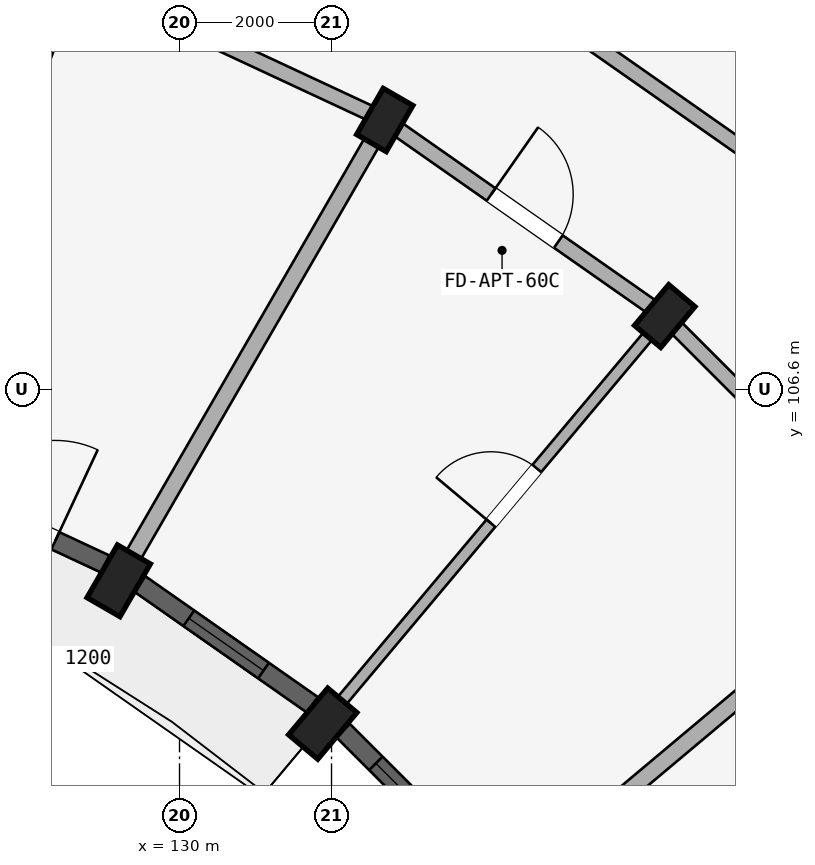
"""IFC4 building model, lengths in metres.
Left out: names, types, materials, properties, quantities, classifications, styles, units other than length and angle.
Written with IfcOpenShell. Run it as: python <this file> out.ifc"""

import sys

from ifc_helpers import new_model, si_unit, direction, frame, frame_2d, origin, origin_2d, place, context, subcontext, project, spatial, rectangle, extrude, element, fill, save


model = new_model("IFC4")
c1 = context("Model", 3, precision=1e-05, world=origin(), true_north=direction((0.0, 1.0)))
c2 = subcontext(c1, "Body", "Model", "MODEL_VIEW")
j1 = project(units=[si_unit("LENGTHUNIT", "METRE"), si_unit("PLANEANGLEUNIT", "RADIAN")], contexts=[c1])
p1 = place(None, origin())
s1 = spatial("IfcSite", under=j1, at=p1, CompositionType="ELEMENT")
p2 = place(p1, origin())
s2 = spatial("IfcBuilding", under=s1, at=p2, CompositionType="ELEMENT")
p3 = place(p2, frame((0.0, 0.0, 18.15)))
s3 = spatial("IfcBuildingStorey", under=s2, at=p3, CompositionType="ELEMENT", Elevation=18.15)
p4 = place(p3, frame((129.2, 104.081, 0.0), z_axis=(0.0, 0.0, 1.0), x_axis=(-0.866025403784, 0.5, 0.0)))
e1 = element("IfcColumn", 1, at=p4, inside=s3, PredefinedType="COLUMN", context=c2, shape_type="SweptSolid", body=[
    extrude(rectangle(XDim=0.5, YDim=0.8, at=origin_2d()), origin(), (0.0, 0.0, 1.0), 2.93),
])
p5 = place(p3, frame((132.7, 110.144, 0.0), z_axis=(0.0, 0.0, 1.0), x_axis=(-0.866025403784, 0.5, 0.0)))
e2 = element("IfcColumn", 2, at=p5, inside=s3, PredefinedType="COLUMN", context=c2, shape_type="SweptSolid", body=[
    extrude(rectangle(XDim=0.45, YDim=0.7, at=origin_2d()), origin(), (0.0, 0.0, 1.0), 2.93),
])
p6 = place(p3, frame((131.885, 102.202, 0.0), z_axis=(0.0, 0.0, 1.0), x_axis=(-0.766044443119, 0.642787609687, 0.0)))
e3 = element("IfcColumn", 3, at=p6, inside=s3, PredefinedType="COLUMN", context=c2, shape_type="SweptSolid", body=[
    extrude(rectangle(XDim=0.5, YDim=0.8, at=origin_2d()), origin(), (0.0, 0.0, 1.0), 2.93),
])
p7 = place(p3, frame((136.384, 107.564, 0.0), z_axis=(0.0, 0.0, 1.0), x_axis=(-0.766044443119, 0.642787609687, 0.0)))
e4 = element("IfcColumn", 4, at=p7, inside=s3, PredefinedType="COLUMN", context=c2, shape_type="SweptSolid", body=[
    extrude(rectangle(XDim=0.45, YDim=0.7, at=origin_2d()), origin(), (0.0, 0.0, 1.0), 2.93),
])
p8 = place(p3, frame((128.624, 112.044, 0.0), z_axis=(0.0, 0.0, 1.0), x_axis=(0.906307919131, -0.422617978463, 0.0)))
e5 = element("IfcWall", 5, at=p8, inside=s3, PredefinedType="STANDARD", context=c2, shape_type="SweptSolid", body=[
    extrude(rectangle(XDim=4.497, YDim=0.2, at=frame_2d((2.249, 0.0))), origin(), (0.0, 0.0, 1.0), 2.372),
])
p9 = place(p3, frame((132.7, 110.144, 0.0), z_axis=(0.0, 0.0, 1.0), x_axis=(0.819155404658, -0.573571637217, 0.0)))
e6 = element("IfcWall", 6, at=p9, inside=s3, PredefinedType="STANDARD", context=c2, shape_type="SweptSolid", body=[
    extrude(rectangle(XDim=4.497, YDim=0.2, at=frame_2d((2.249, 0.0))), origin(), (0.0, 0.0, 1.0), 2.372),
])
p10 = place(p9, frame((1.709, 0.0, 0.0)))
e7 = element("IfcOpeningElement", 7, at=p10, cuts=e6, PredefinedType="OPENING", context=c2, shape_type="SweptSolid", body=[
    extrude(rectangle(XDim=1.08, YDim=2.15, at=frame_2d((0.54, 1.075))), frame((0.0, 0.11, 0.0), z_axis=(0.0, -1.0, 0.0), x_axis=(1.0, 0.0, 0.0)), (0.0, 0.0, 1.0), 0.22),
])
p11 = place(p3, frame((133.9, 112.222, 0.0), z_axis=(0.0, 0.0, 1.0), x_axis=(0.819140911474, -0.573592335331, 0.0)))
e8 = element("IfcWall", 8, at=p11, inside=s3, PredefinedType="STANDARD", context=c2, shape_type="SweptSolid", body=[
    extrude(rectangle(XDim=4.916, YDim=0.2, at=frame_2d((2.458, 0.0))), origin(), (0.0, 0.0, 1.0), 2.372),
])
p12 = place(p3, frame((136.384, 107.564, 0.0), z_axis=(0.0, 0.0, 1.0), x_axis=(0.707106781187, -0.707106781187, 0.0)))
e9 = element("IfcWall", 9, at=p12, inside=s3, PredefinedType="STANDARD", context=c2, shape_type="SweptSolid", body=[
    extrude(rectangle(XDim=4.497, YDim=0.2, at=frame_2d((2.249, 0.0))), origin(), (0.0, 0.0, 1.0), 2.372),
])
p13 = place(p3, frame((126.298, 105.654, 0.0), z_axis=(0.0, 0.0, 1.0), x_axis=(0.342010221662, 0.939696231917, 0.0)))
e10 = element("IfcWall", 10, at=p13, inside=s3, PredefinedType="PARTITIONING", context=c2, shape_type="SweptSolid", body=[
    extrude(rectangle(XDim=6.75, YDim=0.15, at=frame_2d((3.375, 0.0))), origin(), (0.0, 0.0, 1.0), 2.372),
])
p14 = place(p13, frame((3.222, 0.0, 0.0)))
e11 = element("IfcOpeningElement", 11, at=p14, cuts=e10, PredefinedType="OPENING", context=c2, shape_type="SweptSolid", body=[
    extrude(rectangle(XDim=0.98, YDim=2.12, at=frame_2d((0.49, 1.06))), frame((0.0, 0.085, 0.0), z_axis=(0.0, -1.0, 0.0), x_axis=(1.0, 0.0, 0.0)), (0.0, 0.0, 1.0), 0.17),
])
p15 = place(p3, frame((129.3, 104.254, 0.0), z_axis=(0.0, 0.0, 1.0), x_axis=(0.499997969693, 0.866026575979, 0.0)))
e12 = element("IfcWall", 12, at=p15, inside=s3, PredefinedType="STANDARD", context=c2, shape_type="SweptSolid", body=[
    extrude(rectangle(XDim=6.75, YDim=0.22, at=frame_2d((3.375, 0.0))), origin(), (0.0, 0.0, 1.0), 2.372),
])
p16 = place(p3, frame((132.013, 102.355, 0.0), z_axis=(0.0, 0.0, 1.0), x_axis=(0.642784846501, 0.766046761698, 0.0)))
e13 = element("IfcWall", 13, at=p16, inside=s3, PredefinedType="PARTITIONING", context=c2, shape_type="SweptSolid", body=[
    extrude(rectangle(XDim=6.75, YDim=0.15, at=frame_2d((3.375, 0.0))), origin(), (0.0, 0.0, 1.0), 2.372),
])
p17 = place(p16, frame((3.242, 0.0, 0.0)))
e14 = element("IfcOpeningElement", 14, at=p17, cuts=e13, PredefinedType="OPENING", context=c2, shape_type="SweptSolid", body=[
    extrude(rectangle(XDim=0.94, YDim=2.1, at=frame_2d((0.47, 1.05))), frame((0.0, 0.085, 0.0), z_axis=(0.0, -1.0, 0.0), x_axis=(1.0, 0.0, 0.0)), (0.0, 0.0, 1.0), 0.17),
])
p18 = place(p3, frame((134.355, 100.013, 0.0), z_axis=(0.0, 0.0, 1.0), x_axis=(0.766046761698, 0.642784846501, 0.0)))
e15 = element("IfcWall", 15, at=p18, inside=s3, PredefinedType="STANDARD", context=c2, shape_type="SweptSolid", body=[
    extrude(rectangle(XDim=6.75, YDim=0.22, at=frame_2d((3.375, 0.0))), origin(), (0.0, 0.0, 1.0), 2.372),
])
p19 = place(p3, frame((126.513, 105.472, 0.0), z_axis=(0.0, 0.0, 1.0), x_axis=(0.906293449611, -0.422649007088, 0.0)))
e16 = element("IfcWall", 16, at=p19, inside=s3, PredefinedType="STANDARD", context=c2, shape_type="SweptSolid", body=[
    extrude(rectangle(XDim=2.77, YDim=0.25, at=frame_2d((1.385, 0.0))), origin(), (0.0, 0.0, 1.0), 2.422),
])
p20 = place(p19, frame((0.725, 0.0, 0.0)))
e17 = element("IfcOpeningElement", 17, at=p20, cuts=e16, PredefinedType="OPENING", context=c2, shape_type="SweptSolid", body=[
    extrude(rectangle(XDim=1.32, YDim=2.15, at=frame_2d((0.66, 1.075))), frame((0.0, 0.135, 0.0), z_axis=(0.0, -1.0, 0.0), x_axis=(1.0, 0.0, 0.0)), (0.0, 0.0, 1.0), 0.27),
])
p21 = place(p3, frame((129.479, 104.038, 0.0), z_axis=(0.0, 0.0, 1.0), x_axis=(0.819111815273, -0.573633885053, 0.0)))
e18 = element("IfcWall", 18, at=p21, inside=s3, PredefinedType="STANDARD", context=c2, shape_type="SweptSolid", body=[
    extrude(rectangle(XDim=2.77, YDim=0.25, at=frame_2d((1.385, 0.0))), origin(), (0.0, 0.0, 1.0), 2.422),
])
p22 = place(p21, frame((0.785, 0.0, 0.722)))
e19 = element("IfcOpeningElement", 19, at=p22, cuts=e18, PredefinedType="OPENING", context=c2, shape_type="SweptSolid", body=[
    extrude(rectangle(XDim=1.2, YDim=1.5, at=frame_2d((0.6, 0.75))), frame((0.0, 0.135, 0.0), z_axis=(0.0, -1.0, 0.0), x_axis=(1.0, 0.0, 0.0)), (0.0, 0.0, 1.0), 0.27),
])
p23 = place(p3, frame((132.152, 102.111, 0.0), z_axis=(0.0, 0.0, 1.0), x_axis=(0.707106781187, -0.707106781187, 0.0)))
e20 = element("IfcWall", 20, at=p23, inside=s3, PredefinedType="STANDARD", context=c2, shape_type="SweptSolid", body=[
    extrude(rectangle(XDim=2.77, YDim=0.25, at=frame_2d((1.385, 0.0))), origin(), (0.0, 0.0, 1.0), 2.422),
])
p24 = place(p23, frame((0.61, 0.0, 0.622)))
e21 = element("IfcOpeningElement", 21, at=p24, cuts=e20, PredefinedType="OPENING", context=c2, shape_type="SweptSolid", body=[
    extrude(rectangle(XDim=1.55, YDim=1.6, at=frame_2d((0.775, 0.8))), frame((0.0, 0.135, 0.0), z_axis=(0.0, -1.0, 0.0), x_axis=(1.0, 0.0, 0.0)), (0.0, 0.0, 1.0), 0.27),
])
p25 = place(p22, origin())
e22 = element("IfcWindow", 22, at=p25, inside=s3, PartitioningType="SINGLE_PANEL", PredefinedType="WINDOW", context=c2, shape_type="SweptSolid", body=[
    extrude(rectangle(XDim=1.2, YDim=1.5, at=frame_2d((0.6, 0.75))), frame((0.0, 0.03, 0.0), z_axis=(0.0, -1.0, 0.0), x_axis=(1.0, 0.0, 0.0)), (0.0, 0.0, 1.0), 0.06),
])
fill(e19, e22)
p26 = place(p24, origin())
e23 = element("IfcWindow", 23, at=p26, inside=s3, PartitioningType="DOUBLE_PANEL_VERTICAL", PredefinedType="WINDOW", context=c2, shape_type="SweptSolid", body=[
    extrude(rectangle(XDim=1.55, YDim=1.6, at=frame_2d((0.775, 0.8))), frame((0.0, 0.03, 0.0), z_axis=(0.0, -1.0, 0.0), x_axis=(1.0, 0.0, 0.0)), (0.0, 0.0, 1.0), 0.06),
])
fill(e21, e23)
p27 = place(p17, origin())
e24 = element("IfcDoor", 24, at=p27, inside=s3, OperationType="SINGLE_SWING_LEFT", PredefinedType="DOOR", context=c2, shape_type="SweptSolid", body=[
    extrude(rectangle(XDim=0.94, YDim=2.1, at=frame_2d((0.47, 1.05))), frame((0.0, 0.025, 0.0), z_axis=(0.0, -1.0, 0.0), x_axis=(1.0, 0.0, 0.0)), (0.0, 0.0, 1.0), 0.05),
])
fill(e14, e24)
p28 = place(p10, origin())
e25 = element("IfcDoor", 25, at=p28, inside=s3, OperationType="SINGLE_SWING_LEFT", PredefinedType="DOOR", context=c2, shape_type="SweptSolid", body=[
    extrude(rectangle(XDim=1.08, YDim=2.15, at=frame_2d((0.54, 1.075))), frame((0.0, 0.025, 0.0), z_axis=(0.0, -1.0, 0.0), x_axis=(1.0, 0.0, 0.0)), (0.0, 0.0, 1.0), 0.05),
])
fill(e7, e25)
p29 = place(p20, frame((1.32, 0.0, 0.0), z_axis=(0.0, 0.0, 1.0), x_axis=(-1.0, 0.0, 0.0)))
e26 = element("IfcDoor", 26, at=p29, inside=s3, OperationType="SINGLE_SWING_LEFT", PredefinedType="DOOR", context=c2, shape_type="SweptSolid", body=[
    extrude(rectangle(XDim=1.32, YDim=2.15, at=frame_2d((0.66, 1.075))), frame((0.0, 0.025, 0.0), z_axis=(0.0, -1.0, 0.0), x_axis=(1.0, 0.0, 0.0)), (0.0, 0.0, 1.0), 0.05),
])
fill(e17, e26)
save(model, sys.argv[1])
